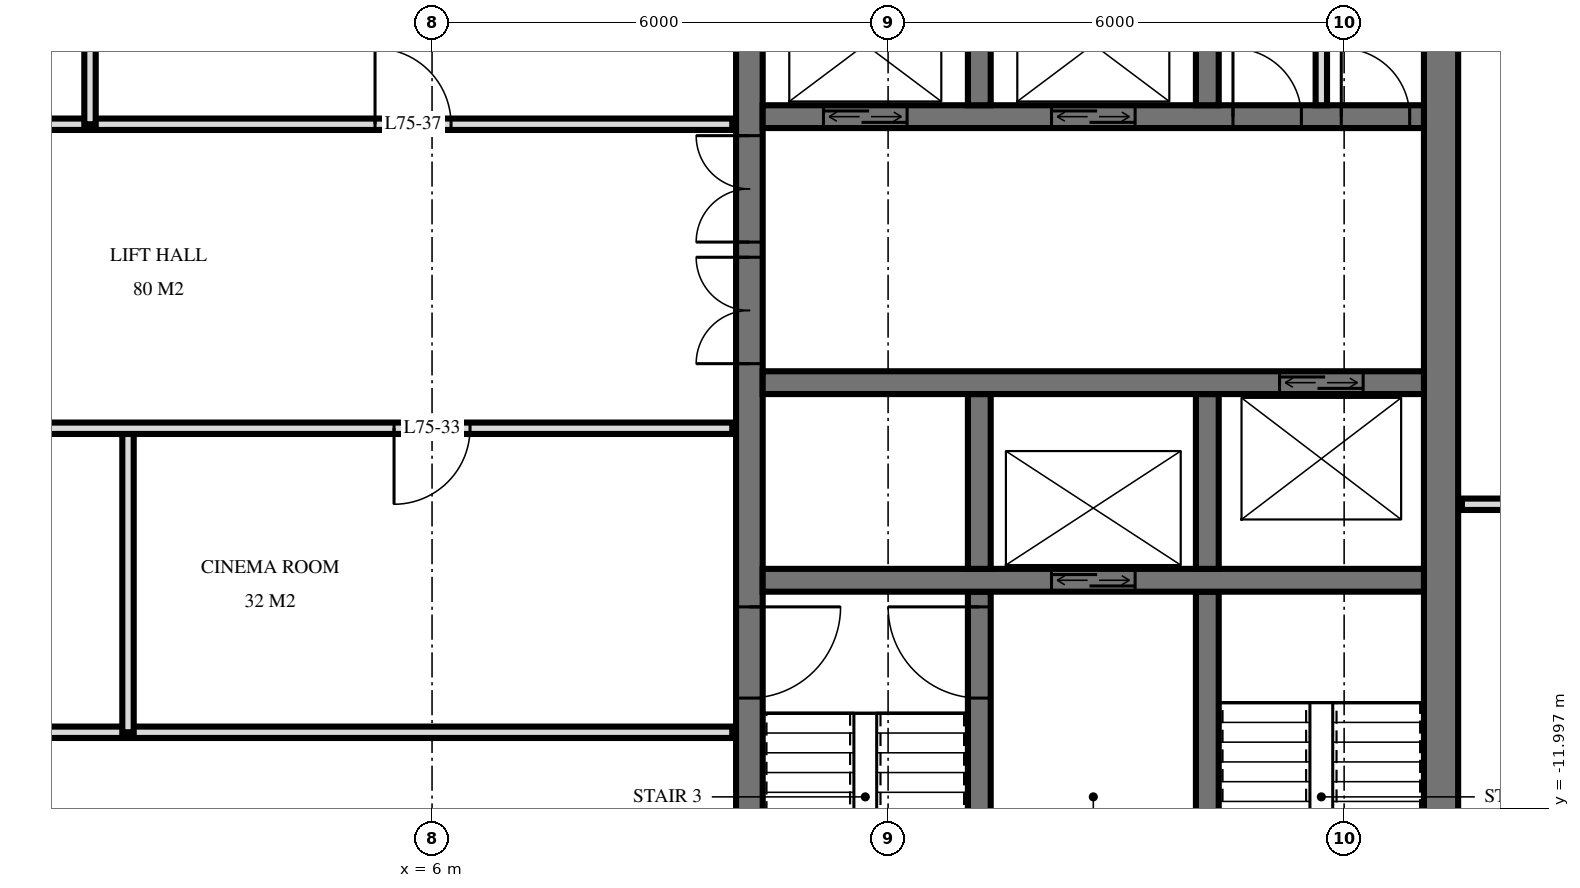
"""IFC4 building model, lengths in metres.
Left out: names, types, materials, properties, quantities, classifications, styles, units other than length and angle.
Written with IfcOpenShell. Run it as: python <this file> out.ifc"""

import sys

from ifc_helpers import new_model, si_unit, direction, frame, frame_2d, origin, place, context, subcontext, project, spatial, rectangle, extrude, element, fill, save


model = new_model("IFC4")
c1 = context("Model", 3, precision=1e-05, world=origin(), true_north=direction((0.0, 1.0)))
c2 = subcontext(c1, "Body", "Model", "MODEL_VIEW")
j1 = project(units=[si_unit("LENGTHUNIT", "METRE"), si_unit("PLANEANGLEUNIT", "RADIAN")], contexts=[c1])
p1 = place(None, origin())
s1 = spatial("IfcSite", under=j1, at=p1, CompositionType="ELEMENT")
p2 = place(p1, origin())
s2 = spatial("IfcBuilding", under=s1, at=p2, CompositionType="ELEMENT")
p3 = place(p2, frame((0.0, 0.0, 284.1)))
s3 = spatial("IfcBuildingStorey", under=s2, at=p3, CompositionType="ELEMENT", Elevation=284.1)
p4 = place(p3, frame((10.175, -14.55, 0.0), z_axis=(0.0, 0.0, 1.0), x_axis=(0.0, 1.0, 0.0)))
e1 = element("IfcWall", 1, at=p4, inside=s3, PredefinedType="SHEAR", context=c2, shape_type="SweptSolid", body=[
    extrude(rectangle(XDim=14.1, YDim=0.35, at=frame_2d((7.05, 0.0))), origin(), (0.0, 0.0, 1.0), 3.5),
])
p5 = place(p4, frame((8.4, 0.0, 0.0)))
e2 = element("IfcOpeningElement", 2, at=p5, cuts=e1, PredefinedType="OPENING", context=c2, shape_type="SweptSolid", body=[
    extrude(rectangle(XDim=1.4, YDim=2.4, at=frame_2d((0.7, 1.2))), frame((0.0, 0.185, 0.0), z_axis=(0.0, -1.0, 0.0), x_axis=(1.0, 0.0, 0.0)), (0.0, 0.0, 1.0), 0.37),
])
p6 = place(p4, frame((10.0, 0.0, 0.0)))
e3 = element("IfcOpeningElement", 3, at=p6, cuts=e1, PredefinedType="OPENING", context=c2, shape_type="SweptSolid", body=[
    extrude(rectangle(XDim=1.4, YDim=2.4, at=frame_2d((0.7, 1.2))), frame((0.0, 0.185, 0.0), z_axis=(0.0, -1.0, 0.0), x_axis=(1.0, 0.0, 0.0)), (0.0, 0.0, 1.0), 0.37),
])
p7 = place(p4, frame((4.0, 0.0, 0.0)))
e4 = element("IfcOpeningElement", 4, at=p7, cuts=e1, PredefinedType="OPENING", context=c2, shape_type="SweptSolid", body=[
    extrude(rectangle(XDim=1.2, YDim=2.1, at=frame_2d((0.6, 1.05))), frame((0.0, 0.185, 0.0), z_axis=(0.0, -1.0, 0.0), x_axis=(1.0, 0.0, 0.0)), (0.0, 0.0, 1.0), 0.37),
])
p8 = place(p3, frame((19.275, -14.55, 0.0), z_axis=(0.0, 0.0, 1.0), x_axis=(0.0, 1.0, 0.0)))
e5 = element("IfcWall", 5, at=p8, inside=s3, PredefinedType="SHEAR", context=c2, shape_type="SweptSolid", body=[
    extrude(rectangle(XDim=14.1, YDim=0.45, at=frame_2d((7.05, 0.0))), origin(), (0.0, 0.0, 1.0), 3.5),
])
p9 = place(p3, frame((10.35, -2.9, 0.0), z_axis=(0.0, 0.0, 1.0), x_axis=(1.0, 0.0, 0.0)))
e6 = element("IfcWall", 6, at=p9, inside=s3, PredefinedType="SHEAR", context=c2, shape_type="SweptSolid", body=[
    extrude(rectangle(XDim=8.7, YDim=0.3, at=frame_2d((4.35, 0.0))), origin(), (0.0, 0.0, 1.0), 3.5),
])
p10 = place(p9, frame((0.8, 0.0, 0.0)))
e7 = element("IfcOpeningElement", 7, at=p10, cuts=e6, PredefinedType="OPENING", context=c2, shape_type="SweptSolid", body=[
    extrude(rectangle(XDim=1.1, YDim=2.1, at=frame_2d((0.55, 1.05))), frame((0.0, 0.16, 0.0), z_axis=(0.0, -1.0, 0.0), x_axis=(1.0, 0.0, 0.0)), (0.0, 0.0, 1.0), 0.32),
])
p11 = place(p9, frame((3.8, 0.0, 0.0)))
e8 = element("IfcOpeningElement", 8, at=p11, cuts=e6, PredefinedType="OPENING", context=c2, shape_type="SweptSolid", body=[
    extrude(rectangle(XDim=1.1, YDim=2.1, at=frame_2d((0.55, 1.05))), frame((0.0, 0.16, 0.0), z_axis=(0.0, -1.0, 0.0), x_axis=(1.0, 0.0, 0.0)), (0.0, 0.0, 1.0), 0.32),
])
p12 = place(p9, frame((6.188, 0.0, 0.0)))
e9 = element("IfcOpeningElement", 9, at=p12, cuts=e6, PredefinedType="OPENING", context=c2, shape_type="SweptSolid", body=[
    extrude(rectangle(XDim=0.9, YDim=2.1, at=frame_2d((0.45, 1.05))), frame((0.0, 0.16, 0.0), z_axis=(0.0, -1.0, 0.0), x_axis=(1.0, 0.0, 0.0)), (0.0, 0.0, 1.0), 0.32),
])
p13 = place(p9, frame((7.613, 0.0, 0.0)))
e10 = element("IfcOpeningElement", 10, at=p13, cuts=e6, PredefinedType="OPENING", context=c2, shape_type="SweptSolid", body=[
    extrude(rectangle(XDim=0.9, YDim=2.1, at=frame_2d((0.45, 1.05))), frame((0.0, 0.16, 0.0), z_axis=(0.0, -1.0, 0.0), x_axis=(1.0, 0.0, 0.0)), (0.0, 0.0, 1.0), 0.32),
])
p14 = place(p3, frame((10.35, -6.4, 0.0), z_axis=(0.0, 0.0, 1.0), x_axis=(1.0, 0.0, 0.0)))
e11 = element("IfcWall", 11, at=p14, inside=s3, PredefinedType="SHEAR", context=c2, shape_type="SweptSolid", body=[
    extrude(rectangle(XDim=8.7, YDim=0.3, at=frame_2d((4.35, 0.0))), origin(), (0.0, 0.0, 1.0), 3.5),
])
p15 = place(p14, frame((6.8, 0.0, 0.0)))
e12 = element("IfcOpeningElement", 12, at=p15, cuts=e11, PredefinedType="OPENING", context=c2, shape_type="SweptSolid", body=[
    extrude(rectangle(XDim=1.1, YDim=2.1, at=frame_2d((0.55, 1.05))), frame((0.0, 0.16, 0.0), z_axis=(0.0, -1.0, 0.0), x_axis=(1.0, 0.0, 0.0)), (0.0, 0.0, 1.0), 0.32),
])
p16 = place(p3, frame((10.35, -9.0, 0.0), z_axis=(0.0, 0.0, 1.0), x_axis=(1.0, 0.0, 0.0)))
e13 = element("IfcWall", 13, at=p16, inside=s3, PredefinedType="SHEAR", context=c2, shape_type="SweptSolid", body=[
    extrude(rectangle(XDim=8.7, YDim=0.3, at=frame_2d((4.35, 0.0))), origin(), (0.0, 0.0, 1.0), 3.5),
])
p17 = place(p16, frame((3.8, 0.0, 0.0)))
e14 = element("IfcOpeningElement", 14, at=p17, cuts=e13, PredefinedType="OPENING", context=c2, shape_type="SweptSolid", body=[
    extrude(rectangle(XDim=1.1, YDim=2.1, at=frame_2d((0.55, 1.05))), frame((0.0, 0.16, 0.0), z_axis=(0.0, -1.0, 0.0), x_axis=(1.0, 0.0, 0.0)), (0.0, 0.0, 1.0), 0.32),
])
for number, where, z_axis, x_axis in (
    (15, (13.2, -2.75, 0.0), (0.0, 0.0, 1.0), (0.0, 1.0, 0.0)),
    (16, (13.2, -8.85, 0.0), (0.0, 0.0, 1.0), (0.0, 1.0, 0.0)),
):
    element("IfcWall", number, at=place(p3, frame(where, z_axis=z_axis, x_axis=x_axis)), inside=s3, PredefinedType="SHEAR", context=c2, shape_type="SweptSolid", body=[
        extrude(rectangle(XDim=2.3, YDim=0.3, at=frame_2d((1.15, 0.0))), origin(), (0.0, 0.0, 1.0), 3.5),
    ])
p18 = place(p3, frame((13.2, -14.55, 0.0), z_axis=(0.0, 0.0, 1.0), x_axis=(0.0, 1.0, 0.0)))
e17 = element("IfcWall", 17, at=p18, inside=s3, PredefinedType="SHEAR", context=c2, shape_type="SweptSolid", body=[
    extrude(rectangle(XDim=5.4, YDim=0.3, at=frame_2d((2.7, 0.0))), origin(), (0.0, 0.0, 1.0), 3.5),
])
p19 = place(p18, frame((4.0, 0.0, 0.0)))
e18 = element("IfcOpeningElement", 18, at=p19, cuts=e17, PredefinedType="OPENING", context=c2, shape_type="SweptSolid", body=[
    extrude(rectangle(XDim=1.2, YDim=2.1, at=frame_2d((0.6, 1.05))), frame((0.0, 0.16, 0.0), z_axis=(0.0, -1.0, 0.0), x_axis=(1.0, 0.0, 0.0)), (0.0, 0.0, 1.0), 0.32),
])
for number, where, z_axis, x_axis in (
    (19, (16.2, -2.75, 0.0), (0.0, 0.0, 1.0), (0.0, 1.0, 0.0)),
    (20, (16.2, -8.85, 0.0), (0.0, 0.0, 1.0), (0.0, 1.0, 0.0)),
):
    element("IfcWall", number, at=place(p3, frame(where, z_axis=z_axis, x_axis=x_axis)), inside=s3, PredefinedType="SHEAR", context=c2, shape_type="SweptSolid", body=[
        extrude(rectangle(XDim=2.3, YDim=0.3, at=frame_2d((1.15, 0.0))), origin(), (0.0, 0.0, 1.0), 3.5),
    ])
p20 = place(p3, frame((16.2, -14.55, 0.0), z_axis=(0.0, 0.0, 1.0), x_axis=(0.0, 1.0, 0.0)))
e21 = element("IfcWall", 21, at=p20, inside=s3, PredefinedType="SHEAR", context=c2, shape_type="SweptSolid", body=[
    extrude(rectangle(XDim=5.4, YDim=0.3, at=frame_2d((2.7, 0.0))), origin(), (0.0, 0.0, 1.0), 3.5),
])
p21 = place(p20, frame((0.2, 0.0, 0.0)))
e22 = element("IfcOpeningElement", 22, at=p21, cuts=e21, PredefinedType="OPENING", context=c2, shape_type="SweptSolid", body=[
    extrude(rectangle(XDim=1.2, YDim=2.1, at=frame_2d((0.6, 1.05))), frame((0.0, 0.16, 0.0), z_axis=(0.0, -1.0, 0.0), x_axis=(1.0, 0.0, 0.0)), (0.0, 0.0, 1.0), 0.32),
])
p22 = place(p3, frame((17.7, -2.75, 0.0), z_axis=(0.0, 0.0, 1.0), x_axis=(0.0, 1.0, 0.0)))
e23 = element("IfcWall", 23, at=p22, inside=s3, PredefinedType="PARTITIONING", context=c2, shape_type="SweptSolid", body=[
    extrude(rectangle(XDim=2.3, YDim=0.15, at=frame_2d((1.15, 0.0))), origin(), (0.0, 0.0, 1.0), 3.2),
])
p23 = place(p3, frame((2.0, -11.0, 0.0), z_axis=(0.0, 0.0, 1.0), x_axis=(0.0, 1.0, 0.0)))
e24 = element("IfcWall", 24, at=p23, inside=s3, PredefinedType="PARTITIONING", context=c2, shape_type="SweptSolid", body=[
    extrude(rectangle(XDim=4.0, YDim=0.15, at=frame_2d((2.0, 0.0))), origin(), (0.0, 0.0, 1.0), 3.22),
])
p24 = place(p3, frame((1.5, -3.0, 0.0), z_axis=(0.0, 0.0, 1.0), x_axis=(0.0, 1.0, 0.0)))
e25 = element("IfcWall", 25, at=p24, inside=s3, PredefinedType="PARTITIONING", context=c2, shape_type="SweptSolid", body=[
    extrude(rectangle(XDim=4.02, YDim=0.15, at=frame_2d((2.01, 0.0))), origin(), (0.0, 0.0, 1.0), 3.22),
])
p25 = place(p3, frame((-9.95, -11.0, 0.0), z_axis=(0.0, 0.0, 1.0), x_axis=(1.0, 0.0, 0.0)))
e26 = element("IfcWall", 26, at=p25, inside=s3, PredefinedType="PARTITIONING", context=c2, shape_type="SweptSolid", body=[
    extrude(rectangle(XDim=19.9, YDim=0.15, at=frame_2d((9.95, 0.0))), origin(), (0.0, 0.0, 1.0), 3.22),
])
p26 = place(p25, frame((9.45, 0.0, 0.0)))
e27 = element("IfcOpeningElement", 27, at=p26, cuts=e26, PredefinedType="OPENING", context=c2, shape_type="SweptSolid", body=[
    extrude(rectangle(XDim=1.0, YDim=2.1, at=frame_2d((0.5, 1.05))), frame((0.0, 0.085, 0.0), z_axis=(0.0, -1.0, 0.0), x_axis=(1.0, 0.0, 0.0)), (0.0, 0.0, 1.0), 0.17),
])
p27 = place(p25, frame((3.45, 0.0, 0.0)))
e28 = element("IfcOpeningElement", 28, at=p27, cuts=e26, PredefinedType="OPENING", context=c2, shape_type="SweptSolid", body=[
    extrude(rectangle(XDim=1.0, YDim=2.1, at=frame_2d((0.5, 1.05))), frame((0.0, 0.085, 0.0), z_axis=(0.0, -1.0, 0.0), x_axis=(1.0, 0.0, 0.0)), (0.0, 0.0, 1.0), 0.17),
])
p28 = place(p3, frame((19.55, -8.0, 0.0), z_axis=(0.0, 0.0, 1.0), x_axis=(1.0, 0.0, 0.0)))
e29 = element("IfcWall", 29, at=p28, inside=s3, PredefinedType="PARTITIONING", context=c2, shape_type="SweptSolid", body=[
    extrude(rectangle(XDim=3.37, YDim=0.15, at=frame_2d((1.685, 0.0))), origin(), (0.0, 0.0, 1.0), 3.22),
])
p29 = place(p28, frame((1.3, 0.0, 0.0)))
e30 = element("IfcOpeningElement", 30, at=p29, cuts=e29, PredefinedType="OPENING", context=c2, shape_type="SweptSolid", body=[
    extrude(rectangle(XDim=0.9, YDim=2.1, at=frame_2d((0.45, 1.05))), frame((0.0, 0.085, 0.0), z_axis=(0.0, -1.0, 0.0), x_axis=(1.0, 0.0, 0.0)), (0.0, 0.0, 1.0), 0.17),
])
p30 = place(p3, frame((-9.95, -7.0, 0.0), z_axis=(0.0, 0.0, 1.0), x_axis=(1.0, 0.0, 0.0)))
e31 = element("IfcWall", 31, at=p30, inside=s3, PredefinedType="PARTITIONING", context=c2, shape_type="SweptSolid", body=[
    extrude(rectangle(XDim=19.9, YDim=0.15, at=frame_2d((9.95, 0.0))), origin(), (0.0, 0.0, 1.0), 3.22),
])
p31 = place(p30, frame((9.45, 0.0, 0.0)))
e32 = element("IfcOpeningElement", 32, at=p31, cuts=e31, PredefinedType="OPENING", context=c2, shape_type="SweptSolid", body=[
    extrude(rectangle(XDim=1.0, YDim=2.1, at=frame_2d((0.5, 1.05))), frame((0.0, 0.085, 0.0), z_axis=(0.0, -1.0, 0.0), x_axis=(1.0, 0.0, 0.0)), (0.0, 0.0, 1.0), 0.17),
])
p32 = place(p30, frame((15.45, 0.0, 0.0)))
e33 = element("IfcOpeningElement", 33, at=p32, cuts=e31, PredefinedType="OPENING", context=c2, shape_type="SweptSolid", body=[
    extrude(rectangle(XDim=1.0, YDim=2.1, at=frame_2d((0.5, 1.05))), frame((0.0, 0.085, 0.0), z_axis=(0.0, -1.0, 0.0), x_axis=(1.0, 0.0, 0.0)), (0.0, 0.0, 1.0), 0.17),
])
p33 = place(p3, frame((-9.95, -3.0, 0.0), z_axis=(0.0, 0.0, 1.0), x_axis=(1.0, 0.0, 0.0)))
e34 = element("IfcWall", 34, at=p33, inside=s3, PredefinedType="PARTITIONING", context=c2, shape_type="SweptSolid", body=[
    extrude(rectangle(XDim=19.9, YDim=0.15, at=frame_2d((9.95, 0.0))), origin(), (0.0, 0.0, 1.0), 3.22),
])
p34 = place(p33, frame((0.95, 0.0, 0.0)))
e35 = element("IfcOpeningElement", 35, at=p34, cuts=e34, PredefinedType="OPENING", context=c2, shape_type="SweptSolid", body=[
    extrude(rectangle(XDim=1.0, YDim=2.1, at=frame_2d((0.5, 1.05))), frame((0.0, 0.085, 0.0), z_axis=(0.0, -1.0, 0.0), x_axis=(1.0, 0.0, 0.0)), (0.0, 0.0, 1.0), 0.17),
])
p35 = place(p33, frame((3.7, 0.0, 0.0)))
e36 = element("IfcOpeningElement", 36, at=p35, cuts=e34, PredefinedType="OPENING", context=c2, shape_type="SweptSolid", body=[
    extrude(rectangle(XDim=1.0, YDim=2.1, at=frame_2d((0.5, 1.05))), frame((0.0, 0.085, 0.0), z_axis=(0.0, -1.0, 0.0), x_axis=(1.0, 0.0, 0.0)), (0.0, 0.0, 1.0), 0.17),
])
p36 = place(p33, frame((7.95, 0.0, 0.0)))
e37 = element("IfcOpeningElement", 37, at=p36, cuts=e34, PredefinedType="OPENING", context=c2, shape_type="SweptSolid", body=[
    extrude(rectangle(XDim=1.0, YDim=2.1, at=frame_2d((0.5, 1.05))), frame((0.0, 0.085, 0.0), z_axis=(0.0, -1.0, 0.0), x_axis=(1.0, 0.0, 0.0)), (0.0, 0.0, 1.0), 0.17),
])
p37 = place(p33, frame((15.2, 0.0, 0.0)))
e38 = element("IfcOpeningElement", 38, at=p37, cuts=e34, PredefinedType="OPENING", context=c2, shape_type="SweptSolid", body=[
    extrude(rectangle(XDim=1.0, YDim=2.1, at=frame_2d((0.5, 1.05))), frame((0.0, 0.085, 0.0), z_axis=(0.0, -1.0, 0.0), x_axis=(1.0, 0.0, 0.0)), (0.0, 0.0, 1.0), 0.17),
])
p38 = place(p10, origin())
e39 = element("IfcDoor", 39, at=p38, inside=s3, OperationType="DOUBLE_DOOR_SLIDING", PredefinedType="USERDEFINED", context=c2, shape_type="SweptSolid", body=[
    extrude(rectangle(XDim=1.1, YDim=2.1, at=frame_2d((0.55, 1.05))), frame((0.0, 0.025, 0.0), z_axis=(0.0, -1.0, 0.0), x_axis=(1.0, 0.0, 0.0)), (0.0, 0.0, 1.0), 0.05),
])
fill(e7, e39)
p39 = place(p11, origin())
e40 = element("IfcDoor", 40, at=p39, inside=s3, OperationType="DOUBLE_DOOR_SLIDING", PredefinedType="USERDEFINED", context=c2, shape_type="SweptSolid", body=[
    extrude(rectangle(XDim=1.1, YDim=2.1, at=frame_2d((0.55, 1.05))), frame((0.0, 0.025, 0.0), z_axis=(0.0, -1.0, 0.0), x_axis=(1.0, 0.0, 0.0)), (0.0, 0.0, 1.0), 0.05),
])
fill(e8, e40)
p40 = place(p17, origin())
e41 = element("IfcDoor", 41, at=p40, inside=s3, OperationType="DOUBLE_DOOR_SLIDING", PredefinedType="USERDEFINED", context=c2, shape_type="SweptSolid", body=[
    extrude(rectangle(XDim=1.1, YDim=2.1, at=frame_2d((0.55, 1.05))), frame((0.0, 0.025, 0.0), z_axis=(0.0, -1.0, 0.0), x_axis=(1.0, 0.0, 0.0)), (0.0, 0.0, 1.0), 0.05),
])
fill(e14, e41)
p41 = place(p15, origin())
e42 = element("IfcDoor", 42, at=p41, inside=s3, OperationType="DOUBLE_DOOR_SLIDING", PredefinedType="USERDEFINED", context=c2, shape_type="SweptSolid", body=[
    extrude(rectangle(XDim=1.1, YDim=2.1, at=frame_2d((0.55, 1.05))), frame((0.0, 0.025, 0.0), z_axis=(0.0, -1.0, 0.0), x_axis=(1.0, 0.0, 0.0)), (0.0, 0.0, 1.0), 0.05),
])
fill(e12, e42)
p42 = place(p5, origin())
e43 = element("IfcDoor", 43, at=p42, inside=s3, OperationType="DOUBLE_DOOR_SINGLE_SWING", PredefinedType="DOOR", context=c2, shape_type="SweptSolid", body=[
    extrude(rectangle(XDim=1.4, YDim=2.4, at=frame_2d((0.7, 1.2))), frame((0.0, 0.025, 0.0), z_axis=(0.0, -1.0, 0.0), x_axis=(1.0, 0.0, 0.0)), (0.0, 0.0, 1.0), 0.05),
])
fill(e2, e43)
p43 = place(p6, origin())
e44 = element("IfcDoor", 44, at=p43, inside=s3, OperationType="DOUBLE_DOOR_SINGLE_SWING", PredefinedType="DOOR", context=c2, shape_type="SweptSolid", body=[
    extrude(rectangle(XDim=1.4, YDim=2.4, at=frame_2d((0.7, 1.2))), frame((0.0, 0.025, 0.0), z_axis=(0.0, -1.0, 0.0), x_axis=(1.0, 0.0, 0.0)), (0.0, 0.0, 1.0), 0.05),
])
fill(e3, e44)
p44 = place(p7, frame((0.6, 0.0, 0.0), z_axis=(0.0, 0.0, 1.0), x_axis=(-1.0, 0.0, 0.0)))
e45 = element("IfcDoor", 45, at=p44, inside=s3, OperationType="SINGLE_SWING_RIGHT", PredefinedType="DOOR", context=c2, shape_type="SweptSolid", body=[
    extrude(rectangle(XDim=1.2, YDim=2.1, at=frame_2d((0.0, 1.05))), frame((0.0, -0.025, 0.0), z_axis=(0.0, 1.0, 0.0), x_axis=(-1.0, 0.0, 0.0)), (0.0, 0.0, 1.0), 0.05),
])
fill(e4, e45)
p45 = place(p12, origin())
e46 = element("IfcDoor", 46, at=p45, inside=s3, OperationType="SINGLE_SWING_RIGHT", PredefinedType="DOOR", context=c2, shape_type="SweptSolid", body=[
    extrude(rectangle(XDim=0.9, YDim=2.1, at=frame_2d((0.45, 1.05))), frame((0.0, 0.025, 0.0), z_axis=(0.0, -1.0, 0.0), x_axis=(1.0, 0.0, 0.0)), (0.0, 0.0, 1.0), 0.05),
])
fill(e9, e46)
p46 = place(p13, origin())
e47 = element("IfcDoor", 47, at=p46, inside=s3, OperationType="SINGLE_SWING_RIGHT", PredefinedType="DOOR", context=c2, shape_type="SweptSolid", body=[
    extrude(rectangle(XDim=0.9, YDim=2.1, at=frame_2d((0.45, 1.05))), frame((0.0, 0.025, 0.0), z_axis=(0.0, -1.0, 0.0), x_axis=(1.0, 0.0, 0.0)), (0.0, 0.0, 1.0), 0.05),
])
fill(e10, e47)
p47 = place(p19, origin())
e48 = element("IfcDoor", 48, at=p47, inside=s3, OperationType="SINGLE_SWING_LEFT", PredefinedType="DOOR", context=c2, shape_type="SweptSolid", body=[
    extrude(rectangle(XDim=1.2, YDim=2.1, at=frame_2d((0.6, 1.05))), frame((0.0, 0.025, 0.0), z_axis=(0.0, -1.0, 0.0), x_axis=(1.0, 0.0, 0.0)), (0.0, 0.0, 1.0), 0.05),
])
fill(e18, e48)
p48 = place(p32, frame((0.5, 0.0, 0.0), z_axis=(0.0, 0.0, 1.0), x_axis=(-1.0, 0.0, 0.0)))
e49 = element("IfcDoor", 49, at=p48, inside=s3, OperationType="SINGLE_SWING_LEFT", PredefinedType="DOOR", context=c2, shape_type="SweptSolid", body=[
    extrude(rectangle(XDim=1.0, YDim=2.1, at=frame_2d((0.0, 1.05))), frame((0.0, -0.025, 0.0), z_axis=(0.0, 1.0, 0.0), x_axis=(-1.0, 0.0, 0.0)), (0.0, 0.0, 1.0), 0.05),
])
fill(e33, e49)
p49 = place(p37, origin())
e50 = element("IfcDoor", 50, at=p49, inside=s3, OperationType="SINGLE_SWING_RIGHT", PredefinedType="DOOR", context=c2, shape_type="SweptSolid", body=[
    extrude(rectangle(XDim=1.0, YDim=2.1, at=frame_2d((0.5, 1.05))), frame((0.0, 0.025, 0.0), z_axis=(0.0, -1.0, 0.0), x_axis=(1.0, 0.0, 0.0)), (0.0, 0.0, 1.0), 0.05),
])
fill(e38, e50)
save(model, sys.argv[1])
